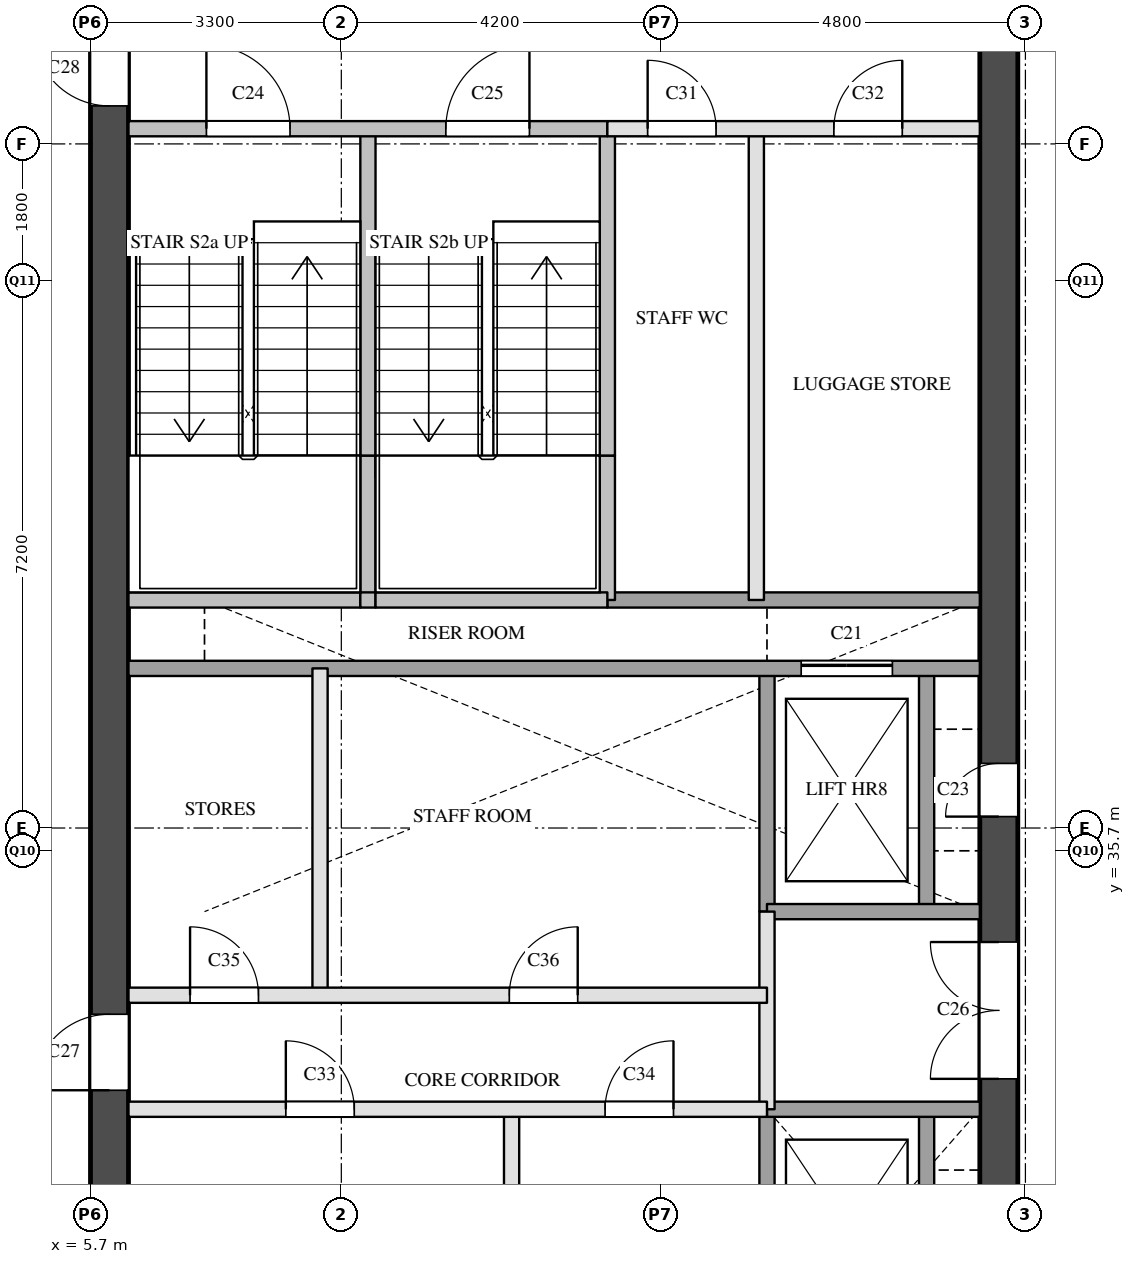
"""IFC4 building model, lengths in metres.
Left out: names, types, materials, properties, quantities, classifications, styles, units other than length and angle.
Written with IfcOpenShell. Run it as: python <this file> out.ifc"""

import sys

from ifc_helpers import new_model, si_unit, direction, frame, frame_2d, origin, place, context, subcontext, project, spatial, rectangle, extrude, element, fill, save


model = new_model("IFC4")
c1 = context("Model", 3, precision=1e-05, world=origin(), true_north=direction((0.0, 1.0)))
c2 = subcontext(c1, "Body", "Model", "MODEL_VIEW")
j1 = project(units=[si_unit("LENGTHUNIT", "METRE"), si_unit("PLANEANGLEUNIT", "RADIAN")], contexts=[c1])
p1 = place(None, origin())
s1 = spatial("IfcSite", under=j1, at=p1, CompositionType="ELEMENT")
p2 = place(p1, origin())
s2 = spatial("IfcBuilding", under=s1, at=p2, CompositionType="ELEMENT")
p3 = place(p2, frame((0.0, 0.0, 142.7)))
s3 = spatial("IfcBuildingStorey", under=s2, at=p3, CompositionType="ELEMENT", Elevation=142.7)
p4 = place(p3, frame((5.95, 29.1, 0.0), z_axis=(0.0, 0.0, 1.0), x_axis=(0.0, 1.0, 0.0)))
e1 = element("IfcWall", 1, at=p4, inside=s3, PredefinedType="SHEAR", context=c2, shape_type="SweptSolid", body=[
    extrude(rectangle(XDim=20.3, YDim=0.5, at=frame_2d((10.15, 0.0))), origin(), (0.0, 0.0, 1.0), 3.6),
])
p5 = place(p4, frame((3.45, 0.0, 0.0)))
e2 = element("IfcOpeningElement", 2, at=p5, cuts=e1, PredefinedType="OPENING", context=c2, shape_type="SweptSolid", body=[
    extrude(rectangle(XDim=1.0, YDim=2.1, at=frame_2d((0.5, 1.05))), frame((0.0, 0.26, 0.0), z_axis=(0.0, -1.0, 0.0), x_axis=(1.0, 0.0, 0.0)), (0.0, 0.0, 1.0), 0.52),
])
p6 = place(p4, frame((16.4, 0.0, 0.0)))
e3 = element("IfcOpeningElement", 3, at=p6, cuts=e1, PredefinedType="OPENING", context=c2, shape_type="SweptSolid", body=[
    extrude(rectangle(XDim=1.0, YDim=2.1, at=frame_2d((0.5, 1.05))), frame((0.0, 0.26, 0.0), z_axis=(0.0, -1.0, 0.0), x_axis=(1.0, 0.0, 0.0)), (0.0, 0.0, 1.0), 0.52),
])
p7 = place(p3, frame((17.65, 29.1, 0.0), z_axis=(0.0, 0.0, 1.0), x_axis=(0.0, 1.0, 0.0)))
e4 = element("IfcWall", 4, at=p7, inside=s3, PredefinedType="SHEAR", context=c2, shape_type="SweptSolid", body=[
    extrude(rectangle(XDim=20.3, YDim=0.5, at=frame_2d((10.15, 0.0))), origin(), (0.0, 0.0, 1.0), 3.6),
])
p8 = place(p7, frame((1.25, 0.0, 0.0)))
e5 = element("IfcOpeningElement", 5, at=p8, cuts=e4, PredefinedType="OPENING", context=c2, shape_type="SweptSolid", body=[
    extrude(rectangle(XDim=0.7, YDim=2.1, at=frame_2d((0.35, 1.05))), frame((0.0, 0.26, 0.0), z_axis=(0.0, -1.0, 0.0), x_axis=(1.0, 0.0, 0.0)), (0.0, 0.0, 1.0), 0.52),
])
p9 = place(p7, frame((7.05, 0.0, 0.0)))
e6 = element("IfcOpeningElement", 6, at=p9, cuts=e4, PredefinedType="OPENING", context=c2, shape_type="SweptSolid", body=[
    extrude(rectangle(XDim=0.7, YDim=2.1, at=frame_2d((0.35, 1.05))), frame((0.0, 0.26, 0.0), z_axis=(0.0, -1.0, 0.0), x_axis=(1.0, 0.0, 0.0)), (0.0, 0.0, 1.0), 0.52),
])
p10 = place(p7, frame((3.6, 0.0, 0.0)))
e7 = element("IfcOpeningElement", 7, at=p10, cuts=e4, PredefinedType="OPENING", context=c2, shape_type="SweptSolid", body=[
    extrude(rectangle(XDim=1.8, YDim=2.1, at=frame_2d((0.9, 1.05))), frame((0.0, 0.26, 0.0), z_axis=(0.0, -1.0, 0.0), x_axis=(1.0, 0.0, 0.0)), (0.0, 0.0, 1.0), 0.52),
])
p11 = place(p3, frame((8.72, 33.8, 0.0), z_axis=(0.0, 0.0, 1.0), x_axis=(0.0, 1.0, 0.0)))
e8 = element("IfcWall", 8, at=p11, inside=s3, PredefinedType="PARTITIONING", context=c2, shape_type="SweptSolid", body=[
    extrude(rectangle(XDim=4.3, YDim=0.2, at=frame_2d((2.15, 0.0))), origin(), (0.0, 0.0, 1.0), 3.6),
])
p12 = place(p3, frame((9.35, 39.0, 0.0), z_axis=(0.0, 0.0, 1.0), x_axis=(0.0, 1.0, 0.0)))
e9 = element("IfcWall", 9, at=p12, inside=s3, PredefinedType="SOLIDWALL", context=c2, shape_type="SweptSolid", body=[
    extrude(rectangle(XDim=1.9, YDim=0.2, at=frame_2d((0.95, 0.0))), origin(), (0.0, 0.0, 1.0), 3.6),
])
p13 = place(p3, frame((9.35, 40.9, 0.0), z_axis=(0.0, 0.0, 1.0), x_axis=(0.0, 1.0, 0.0)))
e10 = element("IfcWall", 10, at=p13, inside=s3, PredefinedType="SOLIDWALL", context=c2, shape_type="SweptSolid", body=[
    extrude(rectangle(XDim=4.3, YDim=0.2, at=frame_2d((2.15, 0.0))), origin(), (0.0, 0.0, 1.0), 3.6),
])
p14 = place(p3, frame((11.24, 29.1, 0.0), z_axis=(0.0, 0.0, 1.0), x_axis=(0.0, 1.0, 0.0)))
e11 = element("IfcWall", 11, at=p14, inside=s3, PredefinedType="PARTITIONING", context=c2, shape_type="SweptSolid", body=[
    extrude(rectangle(XDim=3.2, YDim=0.2, at=frame_2d((1.6, 0.0))), origin(), (0.0, 0.0, 1.0), 3.6),
])
p15 = place(p3, frame((12.5, 39.0, 0.0), z_axis=(0.0, 0.0, 1.0), x_axis=(0.0, 1.0, 0.0)))
e12 = element("IfcWall", 12, at=p15, inside=s3, PredefinedType="SOLIDWALL", context=c2, shape_type="SweptSolid", body=[
    extrude(rectangle(XDim=1.9, YDim=0.2, at=frame_2d((0.95, 0.0))), origin(), (0.0, 0.0, 1.0), 3.6),
])
p16 = place(p3, frame((12.5, 40.9, 0.0), z_axis=(0.0, 0.0, 1.0), x_axis=(0.0, 1.0, 0.0)))
e13 = element("IfcWall", 13, at=p16, inside=s3, PredefinedType="SOLIDWALL", context=c2, shape_type="SweptSolid", body=[
    extrude(rectangle(XDim=4.3, YDim=0.2, at=frame_2d((2.15, 0.0))), origin(), (0.0, 0.0, 1.0), 3.6),
])
p17 = place(p3, frame((14.46, 39.0, 0.0), z_axis=(0.0, 0.0, 1.0), x_axis=(0.0, 1.0, 0.0)))
e14 = element("IfcWall", 14, at=p17, inside=s3, PredefinedType="PARTITIONING", context=c2, shape_type="SweptSolid", body=[
    extrude(rectangle(XDim=6.2, YDim=0.2, at=frame_2d((3.1, 0.0))), origin(), (0.0, 0.0, 1.0), 3.6),
])
p18 = place(p3, frame((14.6, 32.3, 0.0), z_axis=(0.0, 0.0, 1.0), x_axis=(0.0, 1.0, 0.0)))
e15 = element("IfcWall", 15, at=p18, inside=s3, PredefinedType="PARTITIONING", context=c2, shape_type="SweptSolid", body=[
    extrude(rectangle(XDim=2.6, YDim=0.2, at=frame_2d((1.3, 0.0))), origin(), (0.0, 0.0, 1.0), 3.6),
])
p19 = place(p3, frame((14.6, 29.1, 0.0), z_axis=(0.0, 0.0, 1.0), x_axis=(0.0, 1.0, 0.0)))
e16 = element("IfcWall", 16, at=p19, inside=s3, PredefinedType="SOLIDWALL", context=c2, shape_type="SweptSolid", body=[
    extrude(rectangle(XDim=3.2, YDim=0.2, at=frame_2d((1.6, 0.0))), origin(), (0.0, 0.0, 1.0), 3.6),
])
p20 = place(p3, frame((14.6, 34.9, 0.0), z_axis=(0.0, 0.0, 1.0), x_axis=(0.0, 1.0, 0.0)))
e17 = element("IfcWall", 17, at=p20, inside=s3, PredefinedType="SOLIDWALL", context=c2, shape_type="SweptSolid", body=[
    extrude(rectangle(XDim=3.2, YDim=0.2, at=frame_2d((1.6, 0.0))), origin(), (0.0, 0.0, 1.0), 3.6),
])
p21 = place(p3, frame((16.7, 29.1, 0.0), z_axis=(0.0, 0.0, 1.0), x_axis=(0.0, 1.0, 0.0)))
e18 = element("IfcWall", 18, at=p21, inside=s3, PredefinedType="SOLIDWALL", context=c2, shape_type="SweptSolid", body=[
    extrude(rectangle(XDim=3.2, YDim=0.2, at=frame_2d((1.6, 0.0))), origin(), (0.0, 0.0, 1.0), 3.6),
])
p22 = place(p3, frame((16.7, 34.9, 0.0), z_axis=(0.0, 0.0, 1.0), x_axis=(0.0, 1.0, 0.0)))
e19 = element("IfcWall", 19, at=p22, inside=s3, PredefinedType="SOLIDWALL", context=c2, shape_type="SweptSolid", body=[
    extrude(rectangle(XDim=3.2, YDim=0.2, at=frame_2d((1.6, 0.0))), origin(), (0.0, 0.0, 1.0), 3.6),
])
p23 = place(p3, frame((6.2, 32.3, 0.0), z_axis=(0.0, 0.0, 1.0), x_axis=(1.0, 0.0, 0.0)))
e20 = element("IfcWall", 20, at=p23, inside=s3, PredefinedType="PARTITIONING", context=c2, shape_type="SweptSolid", body=[
    extrude(rectangle(XDim=8.4, YDim=0.2, at=frame_2d((4.2, 0.0))), origin(), (0.0, 0.0, 1.0), 3.6),
])
p24 = place(p23, frame((2.07, 0.0, 0.0)))
e21 = element("IfcOpeningElement", 21, at=p24, cuts=e20, PredefinedType="OPENING", context=c2, shape_type="SweptSolid", body=[
    extrude(rectangle(XDim=0.9, YDim=2.1, at=frame_2d((0.45, 1.05))), frame((0.0, 0.11, 0.0), z_axis=(0.0, -1.0, 0.0), x_axis=(1.0, 0.0, 0.0)), (0.0, 0.0, 1.0), 0.22),
])
p25 = place(p23, frame((6.27, 0.0, 0.0)))
e22 = element("IfcOpeningElement", 22, at=p25, cuts=e20, PredefinedType="OPENING", context=c2, shape_type="SweptSolid", body=[
    extrude(rectangle(XDim=0.9, YDim=2.1, at=frame_2d((0.45, 1.05))), frame((0.0, 0.11, 0.0), z_axis=(0.0, -1.0, 0.0), x_axis=(1.0, 0.0, 0.0)), (0.0, 0.0, 1.0), 0.22),
])
p26 = place(p3, frame((14.6, 32.3, 0.0), z_axis=(0.0, 0.0, 1.0), x_axis=(1.0, 0.0, 0.0)))
e23 = element("IfcWall", 23, at=p26, inside=s3, PredefinedType="SOLIDWALL", context=c2, shape_type="SweptSolid", body=[
    extrude(rectangle(XDim=2.8, YDim=0.2, at=frame_2d((1.4, 0.0))), origin(), (0.0, 0.0, 1.0), 3.6),
])
p27 = place(p3, frame((6.2, 33.8, 0.0), z_axis=(0.0, 0.0, 1.0), x_axis=(1.0, 0.0, 0.0)))
e24 = element("IfcWall", 24, at=p27, inside=s3, PredefinedType="PARTITIONING", context=c2, shape_type="SweptSolid", body=[
    extrude(rectangle(XDim=8.4, YDim=0.2, at=frame_2d((4.2, 0.0))), origin(), (0.0, 0.0, 1.0), 3.6),
])
p28 = place(p27, frame((0.81, 0.0, 0.0)))
e25 = element("IfcOpeningElement", 25, at=p28, cuts=e24, PredefinedType="OPENING", context=c2, shape_type="SweptSolid", body=[
    extrude(rectangle(XDim=0.9, YDim=2.1, at=frame_2d((0.45, 1.05))), frame((0.0, 0.11, 0.0), z_axis=(0.0, -1.0, 0.0), x_axis=(1.0, 0.0, 0.0)), (0.0, 0.0, 1.0), 0.22),
])
p29 = place(p27, frame((5.01, 0.0, 0.0)))
e26 = element("IfcOpeningElement", 26, at=p29, cuts=e24, PredefinedType="OPENING", context=c2, shape_type="SweptSolid", body=[
    extrude(rectangle(XDim=0.9, YDim=2.1, at=frame_2d((0.45, 1.05))), frame((0.0, 0.11, 0.0), z_axis=(0.0, -1.0, 0.0), x_axis=(1.0, 0.0, 0.0)), (0.0, 0.0, 1.0), 0.22),
])
p30 = place(p3, frame((14.6, 34.9, 0.0), z_axis=(0.0, 0.0, 1.0), x_axis=(1.0, 0.0, 0.0)))
e27 = element("IfcWall", 27, at=p30, inside=s3, PredefinedType="SOLIDWALL", context=c2, shape_type="SweptSolid", body=[
    extrude(rectangle(XDim=2.8, YDim=0.2, at=frame_2d((1.4, 0.0))), origin(), (0.0, 0.0, 1.0), 3.6),
])
p31 = place(p3, frame((6.2, 38.1, 0.0), z_axis=(0.0, 0.0, 1.0), x_axis=(1.0, 0.0, 0.0)))
e28 = element("IfcWall", 28, at=p31, inside=s3, PredefinedType="SOLIDWALL", context=c2, shape_type="SweptSolid", body=[
    extrude(rectangle(XDim=11.2, YDim=0.2, at=frame_2d((5.6, 0.0))), origin(), (0.0, 0.0, 1.0), 3.6),
])
p32 = place(p31, frame((8.85, 0.0, 0.0)))
e29 = element("IfcOpeningElement", 29, at=p32, cuts=e28, PredefinedType="OPENING", context=c2, shape_type="SweptSolid", body=[
    extrude(rectangle(XDim=1.2, YDim=2.1, at=frame_2d((0.6, 1.05))), frame((0.0, 0.11, 0.0), z_axis=(0.0, -1.0, 0.0), x_axis=(1.0, 0.0, 0.0)), (0.0, 0.0, 1.0), 0.22),
])
p33 = place(p3, frame((12.5, 39.0, 0.0), z_axis=(0.0, 0.0, 1.0), x_axis=(1.0, 0.0, 0.0)))
e30 = element("IfcWall", 30, at=p33, inside=s3, PredefinedType="SOLIDWALL", context=c2, shape_type="SweptSolid", body=[
    extrude(rectangle(XDim=4.9, YDim=0.2, at=frame_2d((2.45, 0.0))), origin(), (0.0, 0.0, 1.0), 3.6),
])
p34 = place(p3, frame((6.2, 39.0, 0.0), z_axis=(0.0, 0.0, 1.0), x_axis=(1.0, 0.0, 0.0)))
e31 = element("IfcWall", 31, at=p34, inside=s3, PredefinedType="SOLIDWALL", context=c2, shape_type="SweptSolid", body=[
    extrude(rectangle(XDim=3.05, YDim=0.2, at=frame_2d((1.525, 0.0))), origin(), (0.0, 0.0, 1.0), 3.6),
])
p35 = place(p3, frame((9.25, 39.0, 0.0), z_axis=(0.0, 0.0, 1.0), x_axis=(1.0, 0.0, 0.0)))
e32 = element("IfcWall", 32, at=p35, inside=s3, PredefinedType="SOLIDWALL", context=c2, shape_type="SweptSolid", body=[
    extrude(rectangle(XDim=0.2, YDim=0.2, at=frame_2d((0.1, 0.0))), origin(), (0.0, 0.0, 1.0), 3.6),
])
p36 = place(p3, frame((9.45, 39.0, 0.0), z_axis=(0.0, 0.0, 1.0), x_axis=(1.0, 0.0, 0.0)))
e33 = element("IfcWall", 33, at=p36, inside=s3, PredefinedType="SOLIDWALL", context=c2, shape_type="SweptSolid", body=[
    extrude(rectangle(XDim=3.05, YDim=0.2, at=frame_2d((1.525, 0.0))), origin(), (0.0, 0.0, 1.0), 3.6),
])
p37 = place(p3, frame((12.5, 45.2, 0.0), z_axis=(0.0, 0.0, 1.0), x_axis=(1.0, 0.0, 0.0)))
e34 = element("IfcWall", 34, at=p37, inside=s3, PredefinedType="PARTITIONING", context=c2, shape_type="SweptSolid", body=[
    extrude(rectangle(XDim=4.9, YDim=0.2, at=frame_2d((2.45, 0.0))), origin(), (0.0, 0.0, 1.0), 3.6),
])
p38 = place(p37, frame((0.53, 0.0, 0.0)))
e35 = element("IfcOpeningElement", 35, at=p38, cuts=e34, PredefinedType="OPENING", context=c2, shape_type="SweptSolid", body=[
    extrude(rectangle(XDim=0.9, YDim=2.1, at=frame_2d((0.45, 1.05))), frame((0.0, 0.11, 0.0), z_axis=(0.0, -1.0, 0.0), x_axis=(1.0, 0.0, 0.0)), (0.0, 0.0, 1.0), 0.22),
])
p39 = place(p37, frame((2.98, 0.0, 0.0)))
e36 = element("IfcOpeningElement", 36, at=p39, cuts=e34, PredefinedType="OPENING", context=c2, shape_type="SweptSolid", body=[
    extrude(rectangle(XDim=0.9, YDim=2.1, at=frame_2d((0.45, 1.05))), frame((0.0, 0.11, 0.0), z_axis=(0.0, -1.0, 0.0), x_axis=(1.0, 0.0, 0.0)), (0.0, 0.0, 1.0), 0.22),
])
p40 = place(p3, frame((6.2, 45.2, 0.0), z_axis=(0.0, 0.0, 1.0), x_axis=(1.0, 0.0, 0.0)))
e37 = element("IfcWall", 37, at=p40, inside=s3, PredefinedType="SOLIDWALL", context=c2, shape_type="SweptSolid", body=[
    extrude(rectangle(XDim=6.3, YDim=0.2, at=frame_2d((3.15, 0.0))), origin(), (0.0, 0.0, 1.0), 3.6),
])
p41 = place(p40, frame((1.025, 0.0, 0.0)))
e38 = element("IfcOpeningElement", 38, at=p41, cuts=e37, PredefinedType="OPENING", context=c2, shape_type="SweptSolid", body=[
    extrude(rectangle(XDim=1.1, YDim=2.1, at=frame_2d((0.55, 1.05))), frame((0.0, 0.11, 0.0), z_axis=(0.0, -1.0, 0.0), x_axis=(1.0, 0.0, 0.0)), (0.0, 0.0, 1.0), 0.22),
])
p42 = place(p40, frame((4.175, 0.0, 0.0)))
e39 = element("IfcOpeningElement", 39, at=p42, cuts=e37, PredefinedType="OPENING", context=c2, shape_type="SweptSolid", body=[
    extrude(rectangle(XDim=1.1, YDim=2.1, at=frame_2d((0.55, 1.05))), frame((0.0, 0.11, 0.0), z_axis=(0.0, -1.0, 0.0), x_axis=(1.0, 0.0, 0.0)), (0.0, 0.0, 1.0), 0.22),
])
p43 = place(p32, origin())
e40 = element("IfcDoor", 40, at=p43, inside=s3, OperationType="SLIDING_TO_LEFT", PredefinedType="DOOR", context=c2, shape_type="SweptSolid", body=[
    extrude(rectangle(XDim=1.2, YDim=2.1, at=frame_2d((0.6, 1.05))), frame((0.0, 0.025, 0.0), z_axis=(0.0, -1.0, 0.0), x_axis=(1.0, 0.0, 0.0)), (0.0, 0.0, 1.0), 0.05),
])
fill(e29, e40)
p44 = place(p9, origin())
e41 = element("IfcDoor", 41, at=p44, inside=s3, OperationType="SINGLE_SWING_LEFT", PredefinedType="DOOR", context=c2, shape_type="SweptSolid", body=[
    extrude(rectangle(XDim=0.7, YDim=2.1, at=frame_2d((0.35, 1.05))), frame((0.0, 0.025, 0.0), z_axis=(0.0, -1.0, 0.0), x_axis=(1.0, 0.0, 0.0)), (0.0, 0.0, 1.0), 0.05),
])
fill(e6, e41)
p45 = place(p41, origin())
e42 = element("IfcDoor", 42, at=p45, inside=s3, OperationType="SINGLE_SWING_LEFT", PredefinedType="DOOR", context=c2, shape_type="SweptSolid", body=[
    extrude(rectangle(XDim=1.1, YDim=2.1, at=frame_2d((0.55, 1.05))), frame((0.0, 0.025, 0.0), z_axis=(0.0, -1.0, 0.0), x_axis=(1.0, 0.0, 0.0)), (0.0, 0.0, 1.0), 0.05),
])
fill(e38, e42)
p46 = place(p42, origin())
e43 = element("IfcDoor", 43, at=p46, inside=s3, OperationType="SINGLE_SWING_RIGHT", PredefinedType="DOOR", context=c2, shape_type="SweptSolid", body=[
    extrude(rectangle(XDim=1.1, YDim=2.1, at=frame_2d((0.55, 1.05))), frame((0.0, 0.025, 0.0), z_axis=(0.0, -1.0, 0.0), x_axis=(1.0, 0.0, 0.0)), (0.0, 0.0, 1.0), 0.05),
])
fill(e39, e43)
p47 = place(p10, origin())
e44 = element("IfcDoor", 44, at=p47, inside=s3, OperationType="DOUBLE_DOOR_SINGLE_SWING", PredefinedType="DOOR", context=c2, shape_type="SweptSolid", body=[
    extrude(rectangle(XDim=1.8, YDim=2.1, at=frame_2d((0.9, 1.05))), frame((0.0, 0.025, 0.0), z_axis=(0.0, -1.0, 0.0), x_axis=(1.0, 0.0, 0.0)), (0.0, 0.0, 1.0), 0.05),
])
fill(e7, e44)
p48 = place(p5, origin())
e45 = element("IfcDoor", 45, at=p48, inside=s3, OperationType="SINGLE_SWING_LEFT", PredefinedType="DOOR", context=c2, shape_type="SweptSolid", body=[
    extrude(rectangle(XDim=1.0, YDim=2.1, at=frame_2d((0.5, 1.05))), frame((0.0, 0.025, 0.0), z_axis=(0.0, -1.0, 0.0), x_axis=(1.0, 0.0, 0.0)), (0.0, 0.0, 1.0), 0.05),
])
fill(e2, e45)
p49 = place(p6, origin())
e46 = element("IfcDoor", 46, at=p49, inside=s3, OperationType="SINGLE_SWING_RIGHT", PredefinedType="DOOR", context=c2, shape_type="SweptSolid", body=[
    extrude(rectangle(XDim=1.0, YDim=2.1, at=frame_2d((0.5, 1.05))), frame((0.0, 0.025, 0.0), z_axis=(0.0, -1.0, 0.0), x_axis=(1.0, 0.0, 0.0)), (0.0, 0.0, 1.0), 0.05),
])
fill(e3, e46)
p50 = place(p38, origin())
e47 = element("IfcDoor", 47, at=p50, inside=s3, OperationType="SINGLE_SWING_LEFT", PredefinedType="DOOR", context=c2, shape_type="SweptSolid", body=[
    extrude(rectangle(XDim=0.9, YDim=2.1, at=frame_2d((0.45, 1.05))), frame((0.0, 0.025, 0.0), z_axis=(0.0, -1.0, 0.0), x_axis=(1.0, 0.0, 0.0)), (0.0, 0.0, 1.0), 0.05),
])
fill(e35, e47)
p51 = place(p39, origin())
e48 = element("IfcDoor", 48, at=p51, inside=s3, OperationType="SINGLE_SWING_RIGHT", PredefinedType="DOOR", context=c2, shape_type="SweptSolid", body=[
    extrude(rectangle(XDim=0.9, YDim=2.1, at=frame_2d((0.45, 1.05))), frame((0.0, 0.025, 0.0), z_axis=(0.0, -1.0, 0.0), x_axis=(1.0, 0.0, 0.0)), (0.0, 0.0, 1.0), 0.05),
])
fill(e36, e48)
p52 = place(p24, origin())
e49 = element("IfcDoor", 49, at=p52, inside=s3, OperationType="SINGLE_SWING_LEFT", PredefinedType="DOOR", context=c2, shape_type="SweptSolid", body=[
    extrude(rectangle(XDim=0.9, YDim=2.1, at=frame_2d((0.45, 1.05))), frame((0.0, 0.025, 0.0), z_axis=(0.0, -1.0, 0.0), x_axis=(1.0, 0.0, 0.0)), (0.0, 0.0, 1.0), 0.05),
])
fill(e21, e49)
p53 = place(p25, origin())
e50 = element("IfcDoor", 50, at=p53, inside=s3, OperationType="SINGLE_SWING_RIGHT", PredefinedType="DOOR", context=c2, shape_type="SweptSolid", body=[
    extrude(rectangle(XDim=0.9, YDim=2.1, at=frame_2d((0.45, 1.05))), frame((0.0, 0.025, 0.0), z_axis=(0.0, -1.0, 0.0), x_axis=(1.0, 0.0, 0.0)), (0.0, 0.0, 1.0), 0.05),
])
fill(e22, e50)
p54 = place(p28, origin())
e51 = element("IfcDoor", 51, at=p54, inside=s3, OperationType="SINGLE_SWING_LEFT", PredefinedType="DOOR", context=c2, shape_type="SweptSolid", body=[
    extrude(rectangle(XDim=0.9, YDim=2.1, at=frame_2d((0.45, 1.05))), frame((0.0, 0.025, 0.0), z_axis=(0.0, -1.0, 0.0), x_axis=(1.0, 0.0, 0.0)), (0.0, 0.0, 1.0), 0.05),
])
fill(e25, e51)
p55 = place(p29, origin())
e52 = element("IfcDoor", 52, at=p55, inside=s3, OperationType="SINGLE_SWING_RIGHT", PredefinedType="DOOR", context=c2, shape_type="SweptSolid", body=[
    extrude(rectangle(XDim=0.9, YDim=2.1, at=frame_2d((0.45, 1.05))), frame((0.0, 0.025, 0.0), z_axis=(0.0, -1.0, 0.0), x_axis=(1.0, 0.0, 0.0)), (0.0, 0.0, 1.0), 0.05),
])
fill(e26, e52)
save(model, sys.argv[1])
